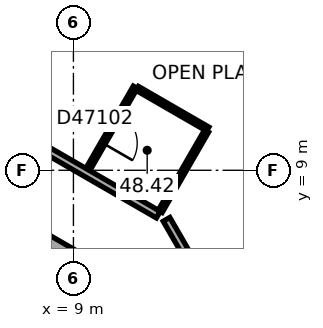
"""IFC4 building model, lengths in metres.
Left out: names, types, materials, properties, quantities, classifications, styles, units other than length and angle.
Written with IfcOpenShell. Run it as: python <this file> out.ifc"""

import sys

from ifc_helpers import new_model, si_unit, direction, frame, frame_2d, origin, place, context, subcontext, project, spatial, rectangle, extrude, element, fill, save


model = new_model("IFC4")
c1 = context("Model", 3, precision=1e-05, world=origin(), true_north=direction((0.0, 1.0)))
c2 = subcontext(c1, "Body", "Model", "MODEL_VIEW")
j1 = project(units=[si_unit("LENGTHUNIT", "METRE"), si_unit("PLANEANGLEUNIT", "RADIAN")], contexts=[c1])
p1 = place(None, origin())
s1 = spatial("IfcSite", under=j1, at=p1, CompositionType="ELEMENT")
p2 = place(p1, origin())
s2 = spatial("IfcBuilding", under=s1, at=p2, CompositionType="ELEMENT")
p3 = place(p2, frame((0.0, 0.0, 194.7)))
s3 = spatial("IfcBuildingStorey", under=s2, at=p3, CompositionType="ELEMENT", Elevation=194.7)
p4 = place(p3, frame((10.25, 5.629, 0.0), z_axis=(0.0, 0.0, 1.0), x_axis=(-0.866022616891, 0.50000482701, 0.0)))
e1 = element("IfcWall", 1, at=p4, inside=s3, PredefinedType="SHEAR", context=c2, shape_type="SweptSolid", body=[
    extrude(rectangle(XDim=12.125, YDim=1.0, at=frame_2d((6.062, 0.0))), origin(), (0.0, 0.0, 1.0), 3.7),
])
p5 = place(p4, frame((2.712, 0.0, 0.0)))
e2 = element("IfcOpeningElement", 2, at=p5, cuts=e1, PredefinedType="OPENING", context=c2, shape_type="SweptSolid", body=[
    extrude(rectangle(XDim=0.9, YDim=2.1, at=frame_2d((0.45, 1.05))), frame((0.0, 0.51, 0.0), z_axis=(0.0, -1.0, 0.0), x_axis=(1.0, 0.0, 0.0)), (0.0, 0.0, 1.0), 1.02),
])
p6 = place(p4, frame((6.612, 0.0, 0.0)))
e3 = element("IfcOpeningElement", 3, at=p6, cuts=e1, PredefinedType="OPENING", context=c2, shape_type="SweptSolid", body=[
    extrude(rectangle(XDim=0.9, YDim=2.1, at=frame_2d((0.45, 1.05))), frame((0.0, 0.51, 0.0), z_axis=(0.0, -1.0, 0.0), x_axis=(1.0, 0.0, 0.0)), (0.0, 0.0, 1.0), 1.02),
])
p7 = place(p3, frame((9.378, 9.019, 0.0), z_axis=(0.0, 0.0, 1.0), x_axis=(0.500004234368, 0.866022959057, 0.0)))
e4 = element("IfcWall", 4, at=p7, inside=s3, PredefinedType="PARTITIONING", context=c2, shape_type="SweptSolid", body=[
    extrude(rectangle(XDim=2.5, YDim=0.12, at=frame_2d((1.25, 0.0))), origin(), (0.0, 0.0, 1.0), 3.42),
])
p8 = place(p7, frame((0.8, 0.0, 0.0)))
e5 = element("IfcOpeningElement", 5, at=p8, cuts=e4, PredefinedType="OPENING", context=c2, shape_type="SweptSolid", body=[
    extrude(rectangle(XDim=0.9, YDim=2.1, at=frame_2d((0.45, 1.05))), frame((0.0, 0.07, 0.0), z_axis=(0.0, -1.0, 0.0), x_axis=(1.0, 0.0, 0.0)), (0.0, 0.0, 1.0), 0.14),
])
p9 = place(p3, frame((10.68, 11.154, 0.0), z_axis=(0.0, 0.0, 1.0), x_axis=(0.86600889856, -0.500028586798, 0.0)))
e6 = element("IfcWall", 6, at=p9, inside=s3, PredefinedType="PARTITIONING", context=c2, shape_type="SweptSolid", body=[
    extrude(rectangle(XDim=2.14, YDim=0.12, at=frame_2d((1.07, 0.0))), origin(), (0.0, 0.0, 1.0), 3.42),
])
p10 = place(p3, frame((11.233, 7.833, 0.0), z_axis=(0.0, 0.0, 1.0), x_axis=(-0.866021713988, 0.50000639086, 0.0)))
e7 = element("IfcWall", 7, at=p10, inside=s3, PredefinedType="PARTITIONING", context=c2, shape_type="SweptSolid", body=[
    extrude(rectangle(XDim=11.834, YDim=0.2, at=frame_2d((5.917, 0.0))), origin(), (0.0, 0.0, 1.0), 3.42),
])
p11 = place(p10, frame((6.288, 0.0, 0.0)))
e8 = element("IfcOpeningElement", 8, at=p11, cuts=e7, PredefinedType="OPENING", context=c2, shape_type="SweptSolid", body=[
    extrude(rectangle(XDim=1.0, YDim=2.1, at=frame_2d((0.5, 1.05))), frame((0.0, 0.11, 0.0), z_axis=(0.0, -1.0, 0.0), x_axis=(1.0, 0.0, 0.0)), (0.0, 0.0, 1.0), 0.22),
])
p12 = place(p3, frame((12.38, 6.097, 0.0), z_axis=(0.0, 0.0, 1.0), x_axis=(-0.499964847546, 0.866045698112, 0.0)))
e9 = element("IfcWall", 9, at=p12, inside=s3, PredefinedType="PARTITIONING", context=c2, shape_type="SweptSolid", body=[
    extrude(rectangle(XDim=1.86, YDim=0.2, at=frame_2d((0.93, 0.0))), origin(), (0.0, 0.0, 1.0), 3.42),
])
p13 = place(p3, frame((12.503, 10.032, 0.0), z_axis=(0.0, 0.0, 1.0), x_axis=(-0.500002508028, -0.866023955769, 0.0)))
e10 = element("IfcWall", 10, at=p13, inside=s3, PredefinedType="PARTITIONING", context=c2, shape_type="SweptSolid", body=[
    extrude(rectangle(XDim=2.44, YDim=0.12, at=frame_2d((1.22, 0.0))), origin(), (0.0, 0.0, 1.0), 3.42),
])
p14 = place(p8, origin())
e11 = element("IfcDoor", 11, at=p14, inside=s3, OperationType="SINGLE_SWING_LEFT", PredefinedType="DOOR", context=c2, shape_type="SweptSolid", body=[
    extrude(rectangle(XDim=0.9, YDim=2.1, at=frame_2d((0.45, 1.05))), frame((0.0, 0.025, 0.0), z_axis=(0.0, -1.0, 0.0), x_axis=(1.0, 0.0, 0.0)), (0.0, 0.0, 1.0), 0.05),
])
fill(e5, e11)
save(model, sys.argv[1])
